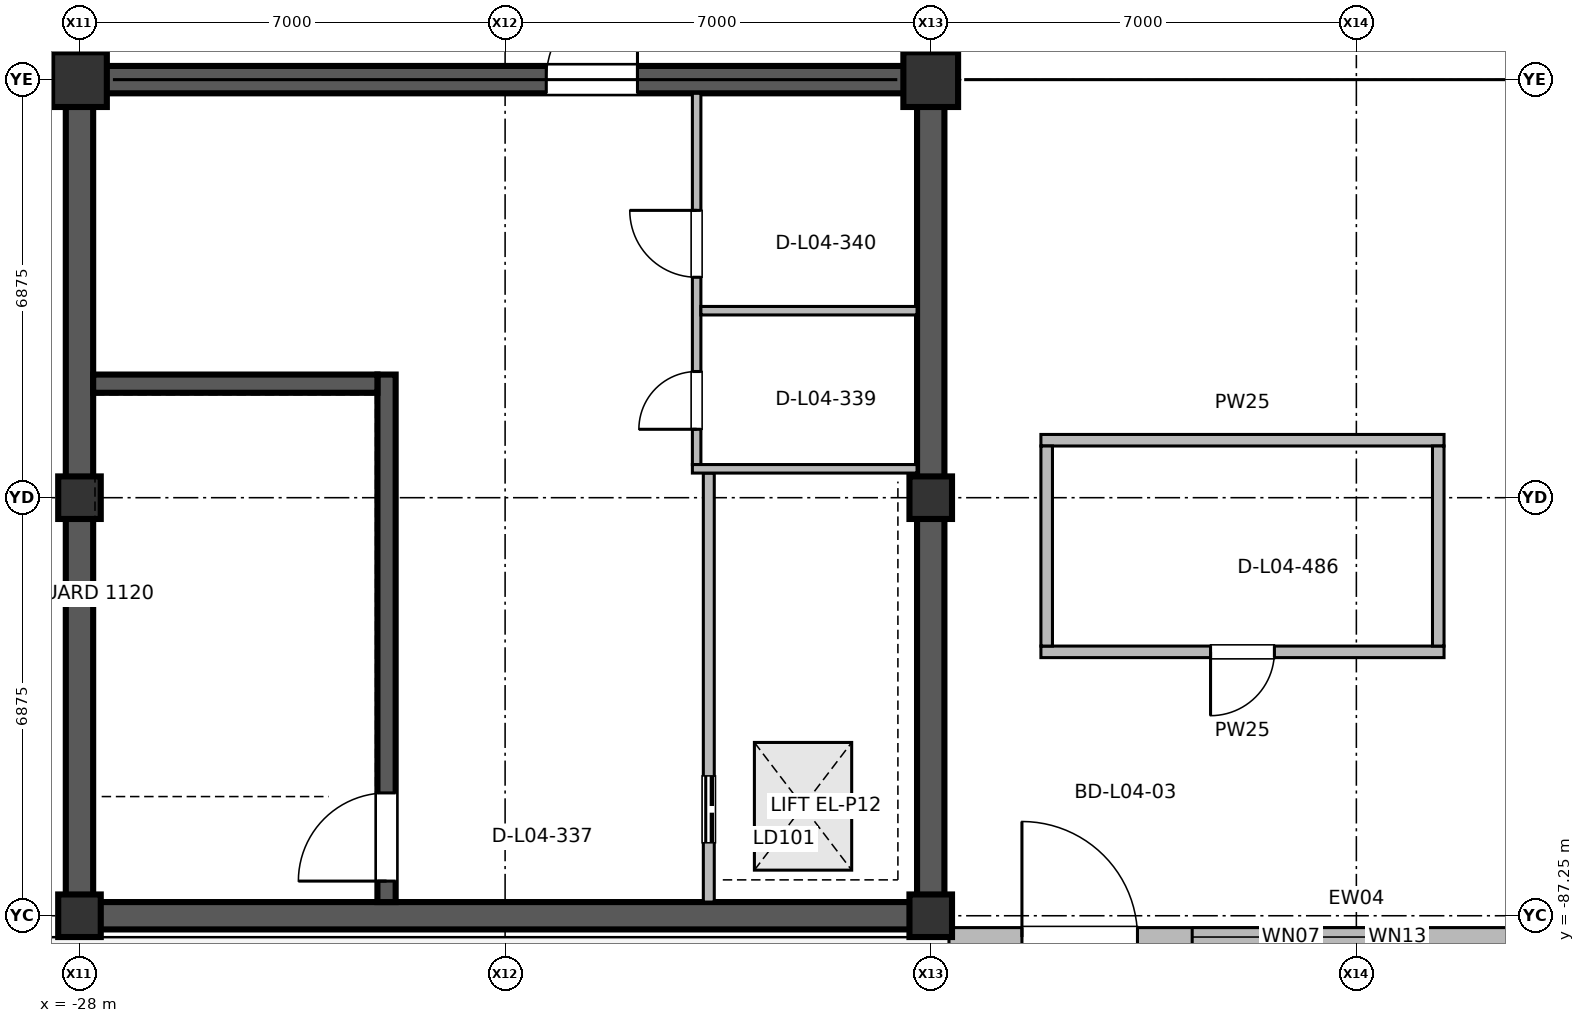
"""IFC4 building model, lengths in metres.
Left out: names, types, materials, properties, quantities, classifications, styles, units other than length and angle.
Written with IfcOpenShell. Run it as: python <this file> out.ifc"""

import sys

from ifc_helpers import new_model, si_unit, direction, frame, frame_2d, origin, origin_2d, place, context, subcontext, project, spatial, rectangle, extrude, element, fill, save


model = new_model("IFC4")
c1 = context("Model", 3, precision=1e-05, world=origin(), true_north=direction((0.0, 1.0)))
c2 = subcontext(c1, "Body", "Model", "MODEL_VIEW")
j1 = project(units=[si_unit("LENGTHUNIT", "METRE"), si_unit("PLANEANGLEUNIT", "RADIAN")], contexts=[c1])
p1 = place(None, origin())
s1 = spatial("IfcSite", under=j1, at=p1, CompositionType="ELEMENT")
p2 = place(p1, origin())
s2 = spatial("IfcBuilding", under=s1, at=p2, CompositionType="ELEMENT")
p3 = place(p2, frame((0.0, 0.0, 16.2)))
s3 = spatial("IfcBuildingStorey", under=s2, at=p3, CompositionType="ELEMENT", Elevation=16.2)
for number, where, z_axis, x_axis in (
    (1, (-28.0, -87.25, 0.0), (0.0, 0.0, 1.0), (1.0, 0.0, 0.0)),
    (2, (-28.0, -80.375, 0.0), (0.0, 0.0, 1.0), (1.0, 0.0, 0.0)),
):
    element("IfcColumn", number, at=place(p3, frame(where, z_axis=z_axis, x_axis=x_axis)), inside=s3, PredefinedType="COLUMN", context=c2, shape_type="SweptSolid", body=[
        extrude(rectangle(XDim=0.7, YDim=0.7, at=origin_2d()), origin(), (0.0, 0.0, 1.0), 4.595),
    ])
p4 = place(p3, frame((-28.0, -73.5, 0.0), z_axis=(0.0, 0.0, 1.0), x_axis=(1.0, 0.0, 0.0)))
e3 = element("IfcColumn", 3, at=p4, inside=s3, PredefinedType="COLUMN", context=c2, shape_type="SweptSolid", body=[
    extrude(rectangle(XDim=0.9, YDim=0.9, at=origin_2d()), origin(), (0.0, 0.0, 1.0), 4.595),
])
for number, where, z_axis, x_axis in (
    (4, (-14.0, -87.25, 0.0), (0.0, 0.0, 1.0), (1.0, 0.0, 0.0)),
    (5, (-14.0, -80.375, 0.0), (0.0, 0.0, 1.0), (1.0, 0.0, 0.0)),
):
    element("IfcColumn", number, at=place(p3, frame(where, z_axis=z_axis, x_axis=x_axis)), inside=s3, PredefinedType="COLUMN", context=c2, shape_type="SweptSolid", body=[
        extrude(rectangle(XDim=0.7, YDim=0.7, at=origin_2d()), origin(), (0.0, 0.0, 1.0), 4.595),
    ])
p5 = place(p3, frame((-14.0, -73.5, 0.0), z_axis=(0.0, 0.0, 1.0), x_axis=(1.0, 0.0, 0.0)))
e6 = element("IfcColumn", 6, at=p5, inside=s3, PredefinedType="COLUMN", context=c2, shape_type="SweptSolid", body=[
    extrude(rectangle(XDim=0.9, YDim=0.9, at=origin_2d()), origin(), (0.0, 0.0, 1.0), 4.595),
])
for number, where, z_axis, x_axis in (
    (7, (-28.0, -87.025, 0.0), (0.0, 0.0, 1.0), (0.0, 1.0, 0.0)),
    (8, (-14.0, -87.025, 0.0), (0.0, 0.0, 1.0), (0.0, 1.0, 0.0)),
):
    element("IfcWall", number, at=place(p3, frame(where, z_axis=z_axis, x_axis=x_axis)), inside=s3, PredefinedType="SHEAR", context=c2, shape_type="SweptSolid", body=[
        extrude(rectangle(XDim=13.3, YDim=0.45, at=frame_2d((6.65, 0.0))), origin(), (0.0, 0.0, 1.0), 4.595),
    ])
p6 = place(p3, frame((-27.775, -87.25, 0.0), z_axis=(0.0, 0.0, 1.0), x_axis=(1.0, 0.0, 0.0)))
e9 = element("IfcWall", 9, at=p6, inside=s3, PredefinedType="SHEAR", context=c2, shape_type="SweptSolid", body=[
    extrude(rectangle(XDim=13.55, YDim=0.45, at=frame_2d((6.775, 0.0))), origin(), (0.0, 0.0, 1.0), 4.595),
])
p7 = place(p3, frame((-27.775, -73.5, 0.0), z_axis=(0.0, 0.0, 1.0), x_axis=(1.0, 0.0, 0.0)))
e10 = element("IfcWall", 10, at=p7, inside=s3, PredefinedType="SHEAR", context=c2, shape_type="SweptSolid", body=[
    extrude(rectangle(XDim=13.55, YDim=0.45, at=frame_2d((6.775, 0.0))), origin(), (0.0, 0.0, 1.0), 4.595),
])
p8 = place(p7, frame((7.452, 0.0, 0.0)))
e11 = element("IfcOpeningElement", 11, at=p8, cuts=e10, PredefinedType="OPENING", context=c2, shape_type="SweptSolid", body=[
    extrude(rectangle(XDim=1.5, YDim=2.2, at=frame_2d((0.75, 1.1))), frame((0.0, 0.235, 0.0), z_axis=(0.0, -1.0, 0.0), x_axis=(1.0, 0.0, 0.0)), (0.0, 0.0, 1.0), 0.47),
])
p9 = place(p3, frame((-13.7, -87.6, 0.0), z_axis=(0.0, 0.0, 1.0), x_axis=(1.0, 0.0, 0.0)))
e12 = element("IfcWall", 12, at=p9, inside=s3, PredefinedType="SOLIDWALL", context=c2, shape_type="SweptSolid", body=[
    extrude(rectangle(XDim=13.4, YDim=0.31, at=frame_2d((6.7, 0.0))), origin(), (0.0, 0.0, 1.0), 3.47),
])
p10 = place(p9, frame((1.2, 0.0, 0.0)))
e13 = element("IfcOpeningElement", 13, at=p10, cuts=e12, PredefinedType="OPENING", context=c2, shape_type="SweptSolid", body=[
    extrude(rectangle(XDim=1.9, YDim=2.35, at=frame_2d((0.95, 1.175))), frame((0.0, 0.165, 0.0), z_axis=(0.0, -1.0, 0.0), x_axis=(1.0, 0.0, 0.0)), (0.0, 0.0, 1.0), 0.33),
])
p11 = place(p9, frame((4.0, 0.0, 0.9)))
e14 = element("IfcOpeningElement", 14, at=p11, cuts=e12, PredefinedType="OPENING", context=c2, shape_type="SweptSolid", body=[
    extrude(rectangle(XDim=1.2, YDim=1.5, at=frame_2d((0.6, 0.75))), frame((0.0, 0.165, 0.0), z_axis=(0.0, -1.0, 0.0), x_axis=(1.0, 0.0, 0.0)), (0.0, 0.0, 1.0), 0.33),
])
p12 = place(p9, frame((6.05, 0.0, 0.9)))
e15 = element("IfcOpeningElement", 15, at=p12, cuts=e12, PredefinedType="OPENING", context=c2, shape_type="SweptSolid", body=[
    extrude(rectangle(XDim=1.35, YDim=1.75, at=frame_2d((0.675, 0.875))), frame((0.0, 0.165, 0.0), z_axis=(0.0, -1.0, 0.0), x_axis=(1.0, 0.0, 0.0)), (0.0, 0.0, 1.0), 0.33),
])
p13 = place(p3, frame((-22.95, -87.025, 0.0), z_axis=(0.0, 0.0, 1.0), x_axis=(0.0, 1.0, 0.0)))
e16 = element("IfcWall", 16, at=p13, inside=s3, PredefinedType="SHEAR", context=c2, shape_type="SweptSolid", body=[
    extrude(rectangle(XDim=8.675, YDim=0.3, at=frame_2d((4.337, 0.0))), origin(), (0.0, 0.0, 1.0), 4.595),
])
p14 = place(p13, frame((0.345, 0.0, 0.0)))
e17 = element("IfcOpeningElement", 17, at=p14, cuts=e16, PredefinedType="OPENING", context=c2, shape_type="SweptSolid", body=[
    extrude(rectangle(XDim=1.45, YDim=2.2, at=frame_2d((0.725, 1.1))), frame((0.0, 0.16, 0.0), z_axis=(0.0, -1.0, 0.0), x_axis=(1.0, 0.0, 0.0)), (0.0, 0.0, 1.0), 0.32),
])
p15 = place(p3, frame((-17.65, -87.025, 0.0), z_axis=(0.0, 0.0, 1.0), x_axis=(0.0, 1.0, 0.0)))
e18 = element("IfcWall", 18, at=p15, inside=s3, PredefinedType="PARTITIONING", context=c2, shape_type="SweptSolid", body=[
    extrude(rectangle(XDim=7.055, YDim=0.18, at=frame_2d((3.527, 0.0))), origin(), (0.0, 0.0, 1.0), 3.82),
])
p16 = place(p15, frame((0.975, 0.0, 0.0)))
e19 = element("IfcOpeningElement", 19, at=p16, cuts=e18, PredefinedType="OPENING", context=c2, shape_type="SweptSolid", body=[
    extrude(rectangle(XDim=1.1, YDim=2.2, at=frame_2d((0.55, 1.1))), frame((0.0, 0.1, 0.0), z_axis=(0.0, -1.0, 0.0), x_axis=(1.0, 0.0, 0.0)), (0.0, 0.0, 1.0), 0.2),
])
p17 = place(p3, frame((-17.85, -79.83, 0.0), z_axis=(0.0, 0.0, 1.0), x_axis=(0.0, 1.0, 0.0)))
e20 = element("IfcWall", 20, at=p17, inside=s3, PredefinedType="PARTITIONING", context=c2, shape_type="SweptSolid", body=[
    extrude(rectangle(XDim=6.105, YDim=0.14, at=frame_2d((3.052, 0.0))), origin(), (0.0, 0.0, 1.0), 3.82),
])
p18 = place(p17, frame((0.58, 0.0, 0.0)))
e21 = element("IfcOpeningElement", 21, at=p18, cuts=e20, PredefinedType="OPENING", context=c2, shape_type="SweptSolid", body=[
    extrude(rectangle(XDim=0.95, YDim=2.15, at=frame_2d((0.475, 1.075))), frame((0.0, 0.08, 0.0), z_axis=(0.0, -1.0, 0.0), x_axis=(1.0, 0.0, 0.0)), (0.0, 0.0, 1.0), 0.16),
])
p19 = place(p17, frame((3.08, 0.0, 0.0)))
e22 = element("IfcOpeningElement", 22, at=p19, cuts=e20, PredefinedType="OPENING", context=c2, shape_type="SweptSolid", body=[
    extrude(rectangle(XDim=1.1, YDim=2.15, at=frame_2d((0.55, 1.075))), frame((0.0, 0.08, 0.0), z_axis=(0.0, -1.0, 0.0), x_axis=(1.0, 0.0, 0.0)), (0.0, 0.0, 1.0), 0.16),
])
p20 = place(p3, frame((-5.558, -82.91, 0.0), z_axis=(0.0, 0.0, 1.0), x_axis=(-1.0, 0.0, 0.0)))
e23 = element("IfcWall", 23, at=p20, inside=s3, PredefinedType="PARTITIONING", context=c2, shape_type="SweptSolid", body=[
    extrude(rectangle(XDim=6.63, YDim=0.19, at=frame_2d((3.315, 0.0))), origin(), (0.0, 0.0, 1.0), 3.82),
])
p21 = place(p20, frame((2.79, 0.0, 0.0)))
e24 = element("IfcOpeningElement", 24, at=p21, cuts=e23, PredefinedType="OPENING", context=c2, shape_type="SweptSolid", body=[
    extrude(rectangle(XDim=1.05, YDim=2.25, at=frame_2d((0.525, 1.125))), frame((0.0, 0.105, 0.0), z_axis=(0.0, -1.0, 0.0), x_axis=(1.0, 0.0, 0.0)), (0.0, 0.0, 1.0), 0.21),
])
p22 = place(p3, frame((-17.92, -79.9, 0.0), z_axis=(0.0, 0.0, 1.0), x_axis=(1.0, 0.0, 0.0)))
e25 = element("IfcWall", 25, at=p22, inside=s3, PredefinedType="PARTITIONING", context=c2, shape_type="SweptSolid", body=[
    extrude(rectangle(XDim=3.695, YDim=0.14, at=frame_2d((1.847, 0.0))), origin(), (0.0, 0.0, 1.0), 3.82),
])
p23 = place(p3, frame((-17.78, -77.3, 0.0), z_axis=(0.0, 0.0, 1.0), x_axis=(1.0, 0.0, 0.0)))
e26 = element("IfcWall", 26, at=p23, inside=s3, PredefinedType="PARTITIONING", context=c2, shape_type="SweptSolid", body=[
    extrude(rectangle(XDim=3.555, YDim=0.14, at=frame_2d((1.777, 0.0))), origin(), (0.0, 0.0, 1.0), 3.82),
])
p24 = place(p3, frame((-12.188, -79.43, 0.0), z_axis=(0.0, 0.0, 1.0), x_axis=(1.0, 0.0, 0.0)))
e27 = element("IfcWall", 27, at=p24, inside=s3, PredefinedType="PARTITIONING", context=c2, shape_type="SweptSolid", body=[
    extrude(rectangle(XDim=6.63, YDim=0.19, at=frame_2d((3.315, 0.0))), origin(), (0.0, 0.0, 1.0), 3.82),
])
for number, where, z_axis, x_axis in (
    (28, (-12.093, -82.815, 0.0), (0.0, 0.0, 1.0), (0.0, 1.0, 0.0)),
    (29, (-5.653, -82.815, 0.0), (0.0, 0.0, 1.0), (0.0, 1.0, 0.0)),
):
    element("IfcWall", number, at=place(p3, frame(where, z_axis=z_axis, x_axis=x_axis)), inside=s3, PredefinedType="PARTITIONING", context=c2, shape_type="SweptSolid", body=[
        extrude(rectangle(XDim=3.29, YDim=0.19, at=frame_2d((1.645, 0.0))), origin(), (0.0, 0.0, 1.0), 3.47),
    ])
p25 = place(p3, frame((-27.775, -78.5, 0.0), z_axis=(0.0, 0.0, 1.0), x_axis=(1.0, 0.0, 0.0)))
e30 = element("IfcWall", 30, at=p25, inside=s3, PredefinedType="SHEAR", context=c2, shape_type="SweptSolid", body=[
    extrude(rectangle(XDim=4.675, YDim=0.3, at=frame_2d((2.337, 0.0))), origin(), (0.0, 0.0, 1.0), 4.595),
])
p26 = place(p10, origin())
e31 = element("IfcDoor", 31, at=p26, inside=s3, OperationType="SINGLE_SWING_LEFT", PredefinedType="DOOR", context=c2, shape_type="SweptSolid", body=[
    extrude(rectangle(XDim=1.9, YDim=2.35, at=frame_2d((0.95, 1.175))), frame((0.0, 0.025, 0.0), z_axis=(0.0, -1.0, 0.0), x_axis=(1.0, 0.0, 0.0)), (0.0, 0.0, 1.0), 0.05),
])
fill(e13, e31)
p27 = place(p11, origin())
e32 = element("IfcWindow", 32, at=p27, inside=s3, PartitioningType="SINGLE_PANEL", PredefinedType="WINDOW", context=c2, shape_type="SweptSolid", body=[
    extrude(rectangle(XDim=1.2, YDim=1.5, at=frame_2d((0.6, 0.75))), frame((0.0, 0.03, 0.0), z_axis=(0.0, -1.0, 0.0), x_axis=(1.0, 0.0, 0.0)), (0.0, 0.0, 1.0), 0.06),
])
fill(e14, e32)
p28 = place(p12, origin())
e33 = element("IfcWindow", 33, at=p28, inside=s3, PartitioningType="SINGLE_PANEL", PredefinedType="WINDOW", context=c2, shape_type="SweptSolid", body=[
    extrude(rectangle(XDim=1.35, YDim=1.75, at=frame_2d((0.675, 0.875))), frame((0.0, 0.03, 0.0), z_axis=(0.0, -1.0, 0.0), x_axis=(1.0, 0.0, 0.0)), (0.0, 0.0, 1.0), 0.06),
])
fill(e15, e33)
p29 = place(p8, origin())
e34 = element("IfcDoor", 34, at=p29, inside=s3, OperationType="SINGLE_SWING_RIGHT", PredefinedType="DOOR", context=c2, shape_type="SweptSolid", body=[
    extrude(rectangle(XDim=1.5, YDim=2.2, at=frame_2d((0.75, 1.1))), frame((0.0, 0.025, 0.0), z_axis=(0.0, -1.0, 0.0), x_axis=(1.0, 0.0, 0.0)), (0.0, 0.0, 1.0), 0.05),
])
fill(e11, e34)
p30 = place(p14, origin())
e35 = element("IfcDoor", 35, at=p30, inside=s3, OperationType="SINGLE_SWING_LEFT", PredefinedType="DOOR", context=c2, shape_type="SweptSolid", body=[
    extrude(rectangle(XDim=1.45, YDim=2.2, at=frame_2d((0.725, 1.1))), frame((0.0, 0.025, 0.0), z_axis=(0.0, -1.0, 0.0), x_axis=(1.0, 0.0, 0.0)), (0.0, 0.0, 1.0), 0.05),
])
fill(e17, e35)
p31 = place(p16, origin())
e36 = element("IfcDoor", 36, at=p31, inside=s3, OperationType="DOUBLE_DOOR_SLIDING", PredefinedType="DOOR", context=c2, shape_type="SweptSolid", body=[
    extrude(rectangle(XDim=1.1, YDim=2.2, at=frame_2d((0.55, 1.1))), frame((0.0, 0.025, 0.0), z_axis=(0.0, -1.0, 0.0), x_axis=(1.0, 0.0, 0.0)), (0.0, 0.0, 1.0), 0.05),
])
fill(e19, e36)
p32 = place(p18, origin())
e37 = element("IfcDoor", 37, at=p32, inside=s3, OperationType="SINGLE_SWING_LEFT", PredefinedType="DOOR", context=c2, shape_type="SweptSolid", body=[
    extrude(rectangle(XDim=0.95, YDim=2.15, at=frame_2d((0.475, 1.075))), frame((0.0, 0.025, 0.0), z_axis=(0.0, -1.0, 0.0), x_axis=(1.0, 0.0, 0.0)), (0.0, 0.0, 1.0), 0.05),
])
fill(e21, e37)
p33 = place(p19, origin())
e38 = element("IfcDoor", 38, at=p33, inside=s3, OperationType="SINGLE_SWING_RIGHT", PredefinedType="DOOR", context=c2, shape_type="SweptSolid", body=[
    extrude(rectangle(XDim=1.1, YDim=2.15, at=frame_2d((0.55, 1.075))), frame((0.0, 0.025, 0.0), z_axis=(0.0, -1.0, 0.0), x_axis=(1.0, 0.0, 0.0)), (0.0, 0.0, 1.0), 0.05),
])
fill(e22, e38)
p34 = place(p21, origin())
e39 = element("IfcDoor", 39, at=p34, inside=s3, OperationType="SINGLE_SWING_RIGHT", PredefinedType="DOOR", context=c2, shape_type="SweptSolid", body=[
    extrude(rectangle(XDim=1.05, YDim=2.25, at=frame_2d((0.525, 1.125))), frame((0.0, 0.025, 0.0), z_axis=(0.0, -1.0, 0.0), x_axis=(1.0, 0.0, 0.0)), (0.0, 0.0, 1.0), 0.05),
])
fill(e24, e39)
save(model, sys.argv[1])
